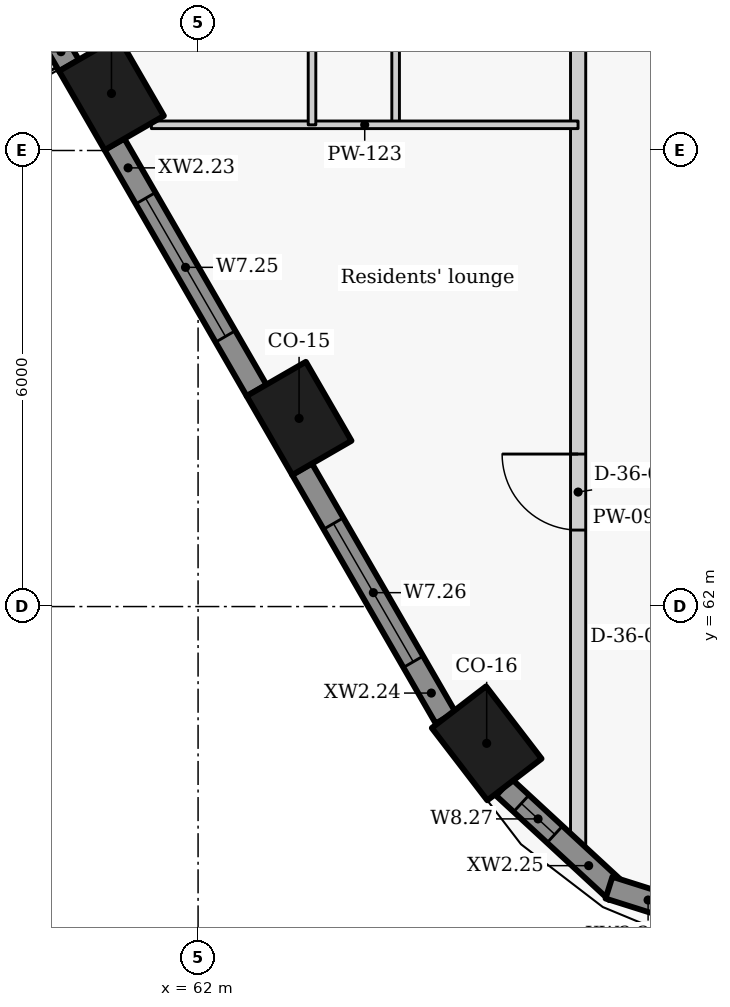
"""IFC4 building model, lengths in metres.
Left out: names, types, materials, properties, quantities, classifications, styles, units other than length and angle.
Written with IfcOpenShell. Run it as: python <this file> out.ifc"""

import sys

from ifc_helpers import new_model, si_unit, direction, frame, frame_2d, origin, origin_2d, place, context, subcontext, project, spatial, rectangle, extrude, element, fill, save


model = new_model("IFC4")
c1 = context("Model", 3, precision=1e-05, world=origin(), true_north=direction((0.0, 1.0)))
c2 = subcontext(c1, "Body", "Model", "MODEL_VIEW")
j1 = project(units=[si_unit("LENGTHUNIT", "METRE"), si_unit("PLANEANGLEUNIT", "RADIAN")], contexts=[c1])
p1 = place(None, origin())
s1 = spatial("IfcSite", under=j1, at=p1, CompositionType="ELEMENT")
p2 = place(p1, origin())
s2 = spatial("IfcBuilding", under=s1, at=p2, CompositionType="ELEMENT")
p3 = place(p2, frame((0.0, 0.0, 216.3)))
s3 = spatial("IfcBuildingStorey", under=s2, at=p3, CompositionType="ELEMENT", Elevation=216.3)
for number, where, z_axis, x_axis in (
    (1, (60.861, 68.75, 0.0), (0.0, 0.0, 1.0), (0.5, -0.866, 0.0)),
    (2, (63.329, 64.475, 0.0), (0.0, 0.0, 1.0), (0.5, -0.866, 0.0)),
    (3, (65.797, 60.2, 0.0), (0.0, 0.0, 1.0), (0.609, -0.793, 0.0)),
):
    element("IfcColumn", number, at=place(p3, frame(where, z_axis=z_axis, x_axis=x_axis)), inside=s3, PredefinedType="COLUMN", context=c2, shape_type="SweptSolid", body=[
        extrude(rectangle(XDim=1.2, YDim=0.9, at=origin_2d()), origin(), (0.0, 0.0, 1.0), 3.3),
    ])
p4 = place(p3, frame((58.579, 72.102, 0.0), z_axis=(0.0, 0.0, 1.0), x_axis=(0.499955427682, -0.866051136095, 0.0)))
e4 = element("IfcWall", 4, at=p4, inside=s3, PredefinedType="SOLIDWALL", context=c2, shape_type="SweptSolid", body=[
    extrude(rectangle(XDim=3.447, YDim=0.3, at=frame_2d((1.724, 0.0))), origin(), (0.0, 0.0, 1.0), 2.05),
])
p5 = place(p4, frame((0.523, 0.0, 0.0)))
e5 = element("IfcOpeningElement", 5, at=p5, cuts=e4, PredefinedType="OPENING", context=c2, shape_type="SweptSolid", body=[
    extrude(rectangle(XDim=2.4, YDim=2.0, at=frame_2d((1.2, 1.0))), frame((0.0, 0.16, 0.0), z_axis=(0.0, -1.0, 0.0), x_axis=(1.0, 0.0, 0.0)), (0.0, 0.0, 1.0), 0.32),
])
p6 = place(p3, frame((60.899, 68.084, 0.0), z_axis=(0.0, 0.0, 1.0), x_axis=(0.500059225181, -0.86599120741, 0.0)))
e6 = element("IfcWall", 6, at=p6, inside=s3, PredefinedType="SOLIDWALL", context=c2, shape_type="SweptSolid", body=[
    extrude(rectangle(XDim=3.744, YDim=0.3, at=frame_2d((1.872, 0.0))), origin(), (0.0, 0.0, 1.0), 2.05),
])
p7 = place(p6, frame((0.822, 0.0, 0.9)))
e7 = element("IfcOpeningElement", 7, at=p7, cuts=e6, PredefinedType="OPENING", context=c2, shape_type="SweptSolid", body=[
    extrude(rectangle(XDim=2.1, YDim=1.1, at=frame_2d((1.05, 0.55))), frame((0.0, 0.16, 0.0), z_axis=(0.0, -1.0, 0.0), x_axis=(1.0, 0.0, 0.0)), (0.0, 0.0, 1.0), 0.32),
])
p8 = place(p3, frame((63.367, 63.809, 0.0), z_axis=(0.0, 0.0, 1.0), x_axis=(0.499961087031, -0.866047869032, 0.0)))
e8 = element("IfcWall", 8, at=p8, inside=s3, PredefinedType="SOLIDWALL", context=c2, shape_type="SweptSolid", body=[
    extrude(rectangle(XDim=3.779, YDim=0.3, at=frame_2d((1.889, 0.0))), origin(), (0.0, 0.0, 1.0), 2.05),
])
p9 = place(p8, frame((0.828, 0.0, 0.9)))
e9 = element("IfcOpeningElement", 9, at=p9, cuts=e8, PredefinedType="OPENING", context=c2, shape_type="SweptSolid", body=[
    extrude(rectangle(XDim=2.1, YDim=1.1, at=frame_2d((1.05, 0.55))), frame((0.0, 0.16, 0.0), z_axis=(0.0, -1.0, 0.0), x_axis=(1.0, 0.0, 0.0)), (0.0, 0.0, 1.0), 0.32),
])
p10 = place(p3, frame((66.022, 59.622, 0.0), z_axis=(0.0, 0.0, 1.0), x_axis=(0.734627852992, -0.678470277616, 0.0)))
e10 = element("IfcWall", 10, at=p10, inside=s3, PredefinedType="SOLIDWALL", context=c2, shape_type="SweptSolid", body=[
    extrude(rectangle(XDim=2.026, YDim=0.3, at=frame_2d((1.013, 0.0))), origin(), (0.0, 0.0, 1.0), 2.05),
])
p11 = place(p10, frame((0.313, 0.0, 0.9)))
e11 = element("IfcOpeningElement", 11, at=p11, cuts=e10, PredefinedType="OPENING", context=c2, shape_type="SweptSolid", body=[
    extrude(rectangle(XDim=0.6, YDim=1.1, at=frame_2d((0.3, 0.55))), frame((0.0, 0.16, 0.0), z_axis=(0.0, -1.0, 0.0), x_axis=(1.0, 0.0, 0.0)), (0.0, 0.0, 1.0), 0.32),
])
p12 = place(p3, frame((67.406, 58.302, 0.0), z_axis=(0.0, 0.0, 1.0), x_axis=(0.953537608367, -0.301274010545, 0.0)))
e12 = element("IfcWall", 12, at=p12, inside=s3, PredefinedType="SOLIDWALL", context=c2, shape_type="SweptSolid", body=[
    extrude(rectangle(XDim=2.048, YDim=0.3, at=frame_2d((1.024, 0.0))), origin(), (0.0, 0.0, 1.0), 2.05),
])
p13 = place(p12, frame((1.18, 0.0, 0.9)))
e13 = element("IfcOpeningElement", 13, at=p13, cuts=e12, PredefinedType="OPENING", context=c2, shape_type="SweptSolid", body=[
    extrude(rectangle(XDim=0.6, YDim=1.1, at=frame_2d((0.3, 0.55))), frame((0.0, 0.16, 0.0), z_axis=(0.0, -1.0, 0.0), x_axis=(1.0, 0.0, 0.0)), (0.0, 0.0, 1.0), 0.32),
])
p14 = place(p3, frame((67.0, 58.674, 0.0), z_axis=(0.0, 0.0, 1.0), x_axis=(0.0, 1.0, 0.0)))
e14 = element("IfcWall", 14, at=p14, inside=s3, PredefinedType="PARTITIONING", context=c2, shape_type="SweptSolid", body=[
    extrude(rectangle(XDim=42.592, YDim=0.2, at=frame_2d((21.296, 0.0))), origin(), (0.0, 0.0, 1.0), 2.03),
])
p15 = place(p14, frame((18.026, 0.0, 0.0)))
e15 = element("IfcOpeningElement", 15, at=p15, cuts=e14, PredefinedType="OPENING", context=c2, shape_type="SweptSolid", body=[
    extrude(rectangle(XDim=1.0, YDim=2.01, at=frame_2d((0.5, 1.005))), frame((0.0, 0.11, 0.0), z_axis=(0.0, -1.0, 0.0), x_axis=(1.0, 0.0, 0.0)), (0.0, 0.0, 1.0), 0.22),
])
p16 = place(p14, frame((19.601, 0.0, 0.0)))
e16 = element("IfcOpeningElement", 16, at=p16, cuts=e14, PredefinedType="OPENING", context=c2, shape_type="SweptSolid", body=[
    extrude(rectangle(XDim=1.0, YDim=2.01, at=frame_2d((0.5, 1.005))), frame((0.0, 0.11, 0.0), z_axis=(0.0, -1.0, 0.0), x_axis=(1.0, 0.0, 0.0)), (0.0, 0.0, 1.0), 0.22),
])
p17 = place(p14, frame((4.332, 0.0, 0.0)))
e17 = element("IfcOpeningElement", 17, at=p17, cuts=e14, PredefinedType="OPENING", context=c2, shape_type="SweptSolid", body=[
    extrude(rectangle(XDim=1.0, YDim=2.01, at=frame_2d((0.5, 1.005))), frame((0.0, 0.11, 0.0), z_axis=(0.0, -1.0, 0.0), x_axis=(1.0, 0.0, 0.0)), (0.0, 0.0, 1.0), 0.22),
])
p18 = place(p14, frame((34.957, 0.0, 0.0)))
e18 = element("IfcOpeningElement", 18, at=p18, cuts=e14, PredefinedType="OPENING", context=c2, shape_type="SweptSolid", body=[
    extrude(rectangle(XDim=1.0, YDim=2.01, at=frame_2d((0.5, 1.005))), frame((0.0, 0.11, 0.0), z_axis=(0.0, -1.0, 0.0), x_axis=(1.0, 0.0, 0.0)), (0.0, 0.0, 1.0), 0.22),
])
p19 = place(p3, frame((64.599, 76.4, 0.0), z_axis=(0.0, 0.0, 1.0), x_axis=(0.0, -1.0, 0.0)))
e19 = element("IfcWall", 19, at=p19, inside=s3, PredefinedType="PARTITIONING", context=c2, shape_type="SweptSolid", body=[
    extrude(rectangle(XDim=8.062, YDim=0.1, at=frame_2d((4.031, 0.0))), origin(), (0.0, 0.0, 1.0), 2.95),
])
p20 = place(p19, frame((5.413, 0.0, 0.0)))
e20 = element("IfcOpeningElement", 20, at=p20, cuts=e19, PredefinedType="OPENING", context=c2, shape_type="SweptSolid", body=[
    extrude(rectangle(XDim=0.9, YDim=2.1, at=frame_2d((0.45, 1.05))), frame((0.0, 0.06, 0.0), z_axis=(0.0, -1.0, 0.0), x_axis=(1.0, 0.0, 0.0)), (0.0, 0.0, 1.0), 0.12),
])
p21 = place(p19, frame((1.408, 0.0, 0.0)))
e21 = element("IfcOpeningElement", 21, at=p21, cuts=e19, PredefinedType="OPENING", context=c2, shape_type="SweptSolid", body=[
    extrude(rectangle(XDim=0.85, YDim=2.1, at=frame_2d((0.425, 1.05))), frame((0.0, 0.06, 0.0), z_axis=(0.0, -1.0, 0.0), x_axis=(1.0, 0.0, 0.0)), (0.0, 0.0, 1.0), 0.12),
])
p22 = place(p3, frame((61.386, 68.338, 0.0), z_axis=(0.0, 0.0, 1.0), x_axis=(1.0, 0.0, 0.0)))
e22 = element("IfcWall", 22, at=p22, inside=s3, PredefinedType="PARTITIONING", context=c2, shape_type="SweptSolid", body=[
    extrude(rectangle(XDim=5.613, YDim=0.1, at=frame_2d((2.807, 0.0))), origin(), (0.0, 0.0, 1.0), 2.95),
])
p23 = place(p3, frame((63.499, 68.337, 0.0), z_axis=(0.0, 0.0, 1.0), x_axis=(0.0, 1.0, 0.0)))
e23 = element("IfcWall", 23, at=p23, inside=s3, PredefinedType="PARTITIONING", context=c2, shape_type="SweptSolid", body=[
    extrude(rectangle(XDim=8.493, YDim=0.1, at=frame_2d((4.246, 0.0))), origin(), (0.0, 0.0, 1.0), 2.95),
])
p24 = place(p23, frame((1.576, 0.0, 0.0)))
e24 = element("IfcOpeningElement", 24, at=p24, cuts=e23, PredefinedType="OPENING", context=c2, shape_type="SweptSolid", body=[
    extrude(rectangle(XDim=0.9, YDim=2.1, at=frame_2d((0.45, 1.05))), frame((0.0, 0.06, 0.0), z_axis=(0.0, -1.0, 0.0), x_axis=(1.0, 0.0, 0.0)), (0.0, 0.0, 1.0), 0.12),
])
p25 = place(p23, frame((5.005, 0.0, 0.0)))
e25 = element("IfcOpeningElement", 25, at=p25, cuts=e23, PredefinedType="OPENING", context=c2, shape_type="SweptSolid", body=[
    extrude(rectangle(XDim=0.9, YDim=2.1, at=frame_2d((0.45, 1.05))), frame((0.0, 0.06, 0.0), z_axis=(0.0, -1.0, 0.0), x_axis=(1.0, 0.0, 0.0)), (0.0, 0.0, 1.0), 0.12),
])
p26 = place(p23, frame((7.225, 0.0, 0.0)))
e26 = element("IfcOpeningElement", 26, at=p26, cuts=e23, PredefinedType="OPENING", context=c2, shape_type="SweptSolid", body=[
    extrude(rectangle(XDim=0.9, YDim=2.1, at=frame_2d((0.45, 1.05))), frame((0.0, 0.06, 0.0), z_axis=(0.0, -1.0, 0.0), x_axis=(1.0, 0.0, 0.0)), (0.0, 0.0, 1.0), 0.12),
])
p27 = place(p7, origin())
e27 = element("IfcWindow", 27, at=p27, inside=s3, PartitioningType="SINGLE_PANEL", PredefinedType="WINDOW", context=c2, shape_type="SweptSolid", body=[
    extrude(rectangle(XDim=2.1, YDim=1.1, at=frame_2d((1.05, 0.55))), frame((0.0, 0.03, 0.0), z_axis=(0.0, -1.0, 0.0), x_axis=(1.0, 0.0, 0.0)), (0.0, 0.0, 1.0), 0.06),
])
fill(e7, e27)
p28 = place(p9, origin())
e28 = element("IfcWindow", 28, at=p28, inside=s3, PartitioningType="SINGLE_PANEL", PredefinedType="WINDOW", context=c2, shape_type="SweptSolid", body=[
    extrude(rectangle(XDim=2.1, YDim=1.1, at=frame_2d((1.05, 0.55))), frame((0.0, 0.03, 0.0), z_axis=(0.0, -1.0, 0.0), x_axis=(1.0, 0.0, 0.0)), (0.0, 0.0, 1.0), 0.06),
])
fill(e9, e28)
p29 = place(p11, origin())
e29 = element("IfcWindow", 29, at=p29, inside=s3, PartitioningType="SINGLE_PANEL", PredefinedType="WINDOW", context=c2, shape_type="SweptSolid", body=[
    extrude(rectangle(XDim=0.6, YDim=1.1, at=frame_2d((0.3, 0.55))), frame((0.0, 0.03, 0.0), z_axis=(0.0, -1.0, 0.0), x_axis=(1.0, 0.0, 0.0)), (0.0, 0.0, 1.0), 0.06),
])
fill(e11, e29)
p30 = place(p17, origin())
e30 = element("IfcDoor", 30, at=p30, inside=s3, OperationType="SINGLE_SWING_RIGHT", PredefinedType="DOOR", context=c2, shape_type="SweptSolid", body=[
    extrude(rectangle(XDim=1.0, YDim=2.01, at=frame_2d((0.5, 1.005))), frame((0.0, 0.025, 0.0), z_axis=(0.0, -1.0, 0.0), x_axis=(1.0, 0.0, 0.0)), (0.0, 0.0, 1.0), 0.05),
])
fill(e17, e30)
save(model, sys.argv[1])
